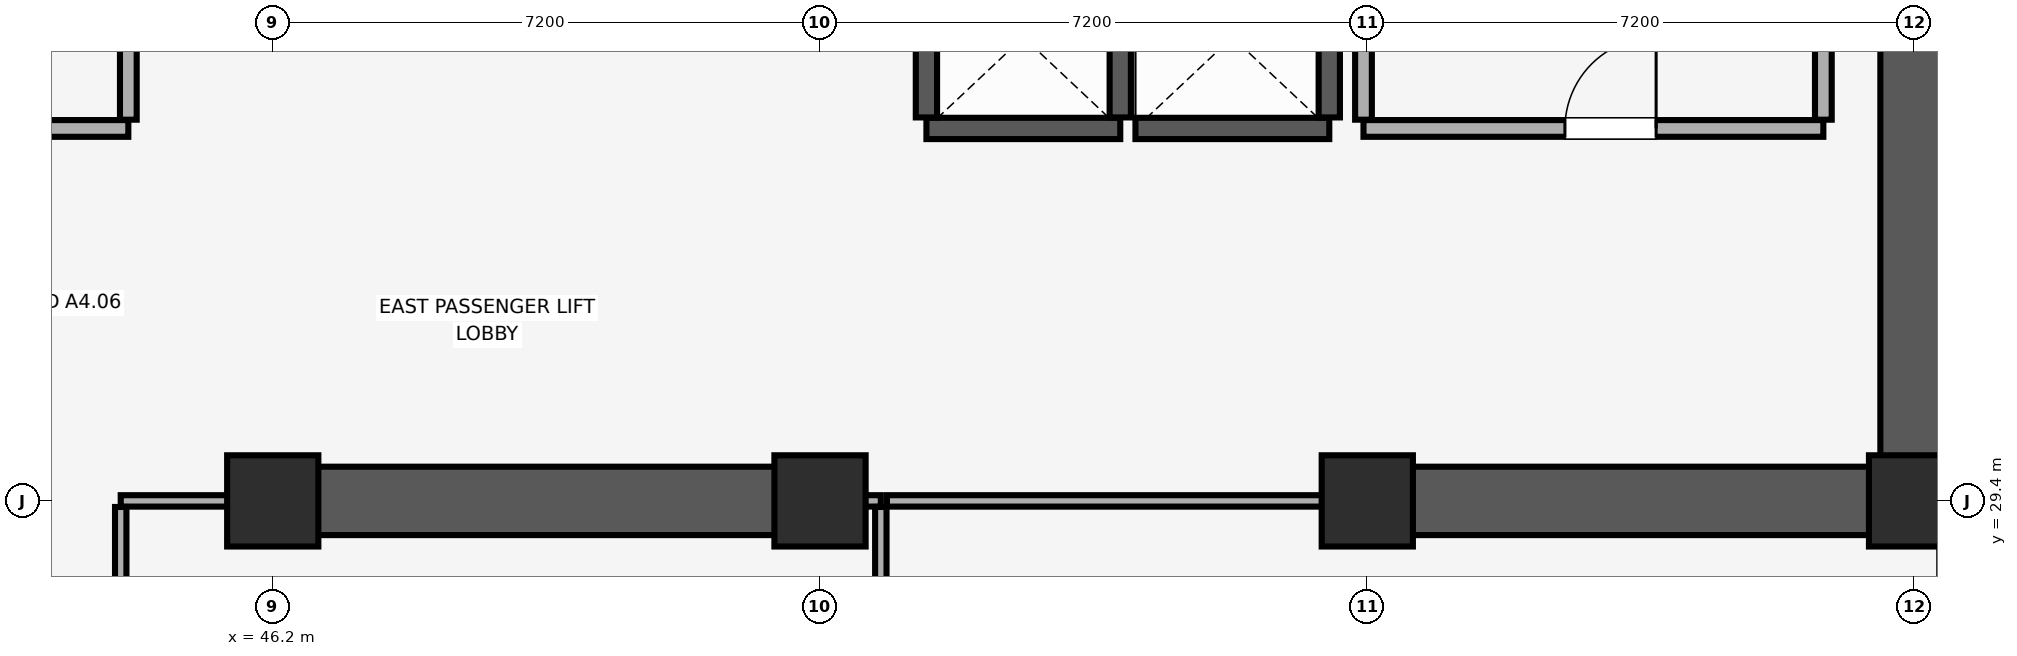
"""IFC4 building model, lengths in metres.
Left out: names, types, materials, properties, quantities, classifications, styles, units other than length and angle.
Written with IfcOpenShell. Run it as: python <this file> out.ifc"""

import sys

from ifc_helpers import new_model, si_unit, direction, frame, frame_2d, origin, origin_2d, place, context, subcontext, project, spatial, rectangle, extrude, element, fill, save


model = new_model("IFC4")
c1 = context("Model", 3, precision=1e-05, world=origin(), true_north=direction((0.0, 1.0)))
c2 = subcontext(c1, "Body", "Model", "MODEL_VIEW")
j1 = project(units=[si_unit("LENGTHUNIT", "METRE"), si_unit("PLANEANGLEUNIT", "RADIAN")], contexts=[c1])
p1 = place(None, origin())
s1 = spatial("IfcSite", under=j1, at=p1, CompositionType="ELEMENT")
p2 = place(p1, origin())
s2 = spatial("IfcBuilding", under=s1, at=p2, CompositionType="ELEMENT")
p3 = place(p2, frame((0.0, 0.0, 126.8)))
s3 = spatial("IfcBuildingStorey", under=s2, at=p3, CompositionType="ELEMENT", Elevation=126.8)
for number, where, z_axis, x_axis in (
    (1, (46.2, 29.4, 0.0), (0.0, 0.0, 1.0), (1.0, 0.0, 0.0)),
    (2, (53.4, 29.4, 0.0), (0.0, 0.0, 1.0), (1.0, 0.0, 0.0)),
    (3, (60.6, 29.4, 0.0), (0.0, 0.0, 1.0), (1.0, 0.0, 0.0)),
    (4, (67.8, 29.4, 0.0), (0.0, 0.0, 1.0), (1.0, 0.0, 0.0)),
):
    element("IfcColumn", number, at=place(p3, frame(where, z_axis=z_axis, x_axis=x_axis)), inside=s3, PredefinedType="COLUMN", context=c2, shape_type="SweptSolid", body=[
        extrude(rectangle(XDim=1.2, YDim=1.2, at=origin_2d()), origin(), (0.0, 0.0, 1.0), 3.51),
    ])
p4 = place(p3, frame((67.8, 29.4, 0.0), z_axis=(0.0, 0.0, 1.0), x_axis=(0.0, 1.0, 0.0)))
e5 = element("IfcWall", 5, at=p4, inside=s3, PredefinedType="SHEAR", context=c2, shape_type="SweptSolid", body=[
    extrude(rectangle(XDim=19.2, YDim=0.9, at=frame_2d((9.6, 0.0))), origin(), (0.0, 0.0, 1.0), 3.51),
])
p5 = place(p3, frame((46.0, 29.4, 0.0), z_axis=(0.0, 0.0, 1.0), x_axis=(1.0, 0.0, 0.0)))
e6 = element("IfcWall", 6, at=p5, inside=s3, PredefinedType="SHEAR", context=c2, shape_type="SweptSolid", body=[
    extrude(rectangle(XDim=7.6, YDim=0.9, at=frame_2d((3.8, 0.0))), origin(), (0.0, 0.0, 1.0), 3.51),
])
p6 = place(p3, frame((60.4, 29.4, 0.0), z_axis=(0.0, 0.0, 1.0), x_axis=(1.0, 0.0, 0.0)))
e7 = element("IfcWall", 7, at=p6, inside=s3, PredefinedType="SHEAR", context=c2, shape_type="SweptSolid", body=[
    extrude(rectangle(XDim=6.945, YDim=0.9, at=frame_2d((3.473, 0.0))), origin(), (0.0, 0.0, 1.0), 3.51),
])
p7 = place(p3, frame((54.8, 34.3, 0.0), z_axis=(0.0, 0.0, 1.0), x_axis=(1.0, 0.0, 0.0)))
e8 = element("IfcWall", 8, at=p7, inside=s3, PredefinedType="SHEAR", context=c2, shape_type="SweptSolid", body=[
    extrude(rectangle(XDim=2.55, YDim=0.28, at=frame_2d((1.275, 0.0))), origin(), (0.0, 0.0, 1.0), 3.51),
])
for number, where, z_axis, x_axis in (
    (9, (54.8, 34.445, 0.0), (0.0, 0.0, 1.0), (0.0, 1.0, 0.0)),
    (10, (57.35, 34.445, 0.0), (0.0, 0.0, 1.0), (0.0, 1.0, 0.0)),
):
    element("IfcWall", number, at=place(p3, frame(where, z_axis=z_axis, x_axis=x_axis)), inside=s3, PredefinedType="SHEAR", context=c2, shape_type="SweptSolid", body=[
        extrude(rectangle(XDim=2.11, YDim=0.28, at=frame_2d((1.055, 0.0))), origin(), (0.0, 0.0, 1.0), 3.51),
    ])
p8 = place(p3, frame((57.55, 34.3, 0.0), z_axis=(0.0, 0.0, 1.0), x_axis=(1.0, 0.0, 0.0)))
e11 = element("IfcWall", 11, at=p8, inside=s3, PredefinedType="SHEAR", context=c2, shape_type="SweptSolid", body=[
    extrude(rectangle(XDim=2.55, YDim=0.28, at=frame_2d((1.275, 0.0))), origin(), (0.0, 0.0, 1.0), 3.51),
])
p9 = place(p3, frame((60.1, 34.445, 0.0), z_axis=(0.0, 0.0, 1.0), x_axis=(0.0, 1.0, 0.0)))
e12 = element("IfcWall", 12, at=p9, inside=s3, PredefinedType="SHEAR", context=c2, shape_type="SweptSolid", body=[
    extrude(rectangle(XDim=2.11, YDim=0.28, at=frame_2d((1.055, 0.0))), origin(), (0.0, 0.0, 1.0), 3.51),
])
p10 = place(p3, frame((60.55, 34.3, 0.0), z_axis=(0.0, 0.0, 1.0), x_axis=(1.0, 0.0, 0.0)))
e13 = element("IfcWall", 13, at=p10, inside=s3, PredefinedType="PARTITIONING", context=c2, shape_type="SweptSolid", body=[
    extrude(rectangle(XDim=6.05, YDim=0.22, at=frame_2d((3.025, 0.0))), origin(), (0.0, 0.0, 1.0), 3.51),
])
p11 = place(p10, frame((2.65, 0.0, 0.0)))
e14 = element("IfcOpeningElement", 14, at=p11, cuts=e13, PredefinedType="OPENING", context=c2, shape_type="SweptSolid", body=[
    extrude(rectangle(XDim=1.2, YDim=2.15, at=frame_2d((0.6, 1.075))), frame((0.0, 0.12, 0.0), z_axis=(0.0, -1.0, 0.0), x_axis=(1.0, 0.0, 0.0)), (0.0, 0.0, 1.0), 0.24),
])
p12 = place(p3, frame((60.55, 34.415, 0.0), z_axis=(0.0, 0.0, 1.0), x_axis=(0.0, 1.0, 0.0)))
e15 = element("IfcWall", 15, at=p12, inside=s3, PredefinedType="PARTITIONING", context=c2, shape_type="SweptSolid", body=[
    extrude(rectangle(XDim=5.64, YDim=0.22, at=frame_2d((2.82, 0.0))), origin(), (0.0, 0.0, 1.0), 3.51),
])
p13 = place(p3, frame((66.6, 34.415, 0.0), z_axis=(0.0, 0.0, 1.0), x_axis=(0.0, 1.0, 0.0)))
e16 = element("IfcWall", 16, at=p13, inside=s3, PredefinedType="PARTITIONING", context=c2, shape_type="SweptSolid", body=[
    extrude(rectangle(XDim=5.43, YDim=0.22, at=frame_2d((2.715, 0.0))), origin(), (0.0, 0.0, 1.0), 3.51),
])
p14 = place(p3, frame((39.7, 34.3, 0.0), z_axis=(0.0, 0.0, 1.0), x_axis=(1.0, 0.0, 0.0)))
e17 = element("IfcWall", 17, at=p14, inside=s3, PredefinedType="PARTITIONING", context=c2, shape_type="SweptSolid", body=[
    extrude(rectangle(XDim=4.6, YDim=0.22, at=frame_2d((2.3, 0.0))), origin(), (0.0, 0.0, 1.0), 3.51),
])
p15 = place(p14, frame((1.7, 0.0, 0.0)))
e18 = element("IfcOpeningElement", 18, at=p15, cuts=e17, PredefinedType="OPENING", context=c2, shape_type="SweptSolid", body=[
    extrude(rectangle(XDim=1.2, YDim=2.15, at=frame_2d((0.6, 1.075))), frame((0.0, 0.12, 0.0), z_axis=(0.0, -1.0, 0.0), x_axis=(1.0, 0.0, 0.0)), (0.0, 0.0, 1.0), 0.24),
])
p16 = place(p3, frame((44.3, 34.415, 0.0), z_axis=(0.0, 0.0, 1.0), x_axis=(0.0, 1.0, 0.0)))
e19 = element("IfcWall", 19, at=p16, inside=s3, PredefinedType="PARTITIONING", context=c2, shape_type="SweptSolid", body=[
    extrude(rectangle(XDim=5.785, YDim=0.22, at=frame_2d((2.893, 0.0))), origin(), (0.0, 0.0, 1.0), 3.51),
])
p17 = place(p3, frame((44.2, 29.4, 0.0), z_axis=(0.0, 0.0, 1.0), x_axis=(1.0, 0.0, 0.0)))
e20 = element("IfcWall", 20, at=p17, inside=s3, PredefinedType="PARTITIONING", context=c2, shape_type="SweptSolid", body=[
    extrude(rectangle(XDim=1.79, YDim=0.15, at=frame_2d((0.895, 0.0))), origin(), (0.0, 0.0, 1.0), 2.41),
])
p18 = place(p3, frame((53.61, 29.4, 0.0), z_axis=(0.0, 0.0, 1.0), x_axis=(1.0, 0.0, 0.0)))
e21 = element("IfcWall", 21, at=p18, inside=s3, PredefinedType="PARTITIONING", context=c2, shape_type="SweptSolid", body=[
    extrude(rectangle(XDim=0.59, YDim=0.15, at=frame_2d((0.295, 0.0))), origin(), (0.0, 0.0, 1.0), 2.41),
])
for number, where, z_axis, x_axis in (
    (22, (44.2, 26.73, 0.0), (0.0, 0.0, 1.0), (0.0, 1.0, 0.0)),
    (23, (54.2, 26.73, 0.0), (0.0, 0.0, 1.0), (0.0, 1.0, 0.0)),
):
    element("IfcWall", number, at=place(p3, frame(where, z_axis=z_axis, x_axis=x_axis)), inside=s3, PredefinedType="PARTITIONING", context=c2, shape_type="SweptSolid", body=[
        extrude(rectangle(XDim=2.59, YDim=0.15, at=frame_2d((1.295, 0.0))), origin(), (0.0, 0.0, 1.0), 3.51),
    ])
p19 = place(p3, frame((54.28, 29.4, 0.0), z_axis=(0.0, 0.0, 1.0), x_axis=(1.0, 0.0, 0.0)))
e24 = element("IfcWall", 24, at=p19, inside=s3, PredefinedType="PARTITIONING", context=c2, shape_type="SweptSolid", body=[
    extrude(rectangle(XDim=6.11, YDim=0.15, at=frame_2d((3.055, 0.0))), origin(), (0.0, 0.0, 1.0), 2.41),
])
p20 = place(p11, origin())
e25 = element("IfcDoor", 25, at=p20, inside=s3, OperationType="SINGLE_SWING_RIGHT", PredefinedType="DOOR", context=c2, shape_type="SweptSolid", body=[
    extrude(rectangle(XDim=1.2, YDim=2.15, at=frame_2d((0.6, 1.075))), frame((0.0, 0.025, 0.0), z_axis=(0.0, -1.0, 0.0), x_axis=(1.0, 0.0, 0.0)), (0.0, 0.0, 1.0), 0.05),
])
fill(e14, e25)
save(model, sys.argv[1])
